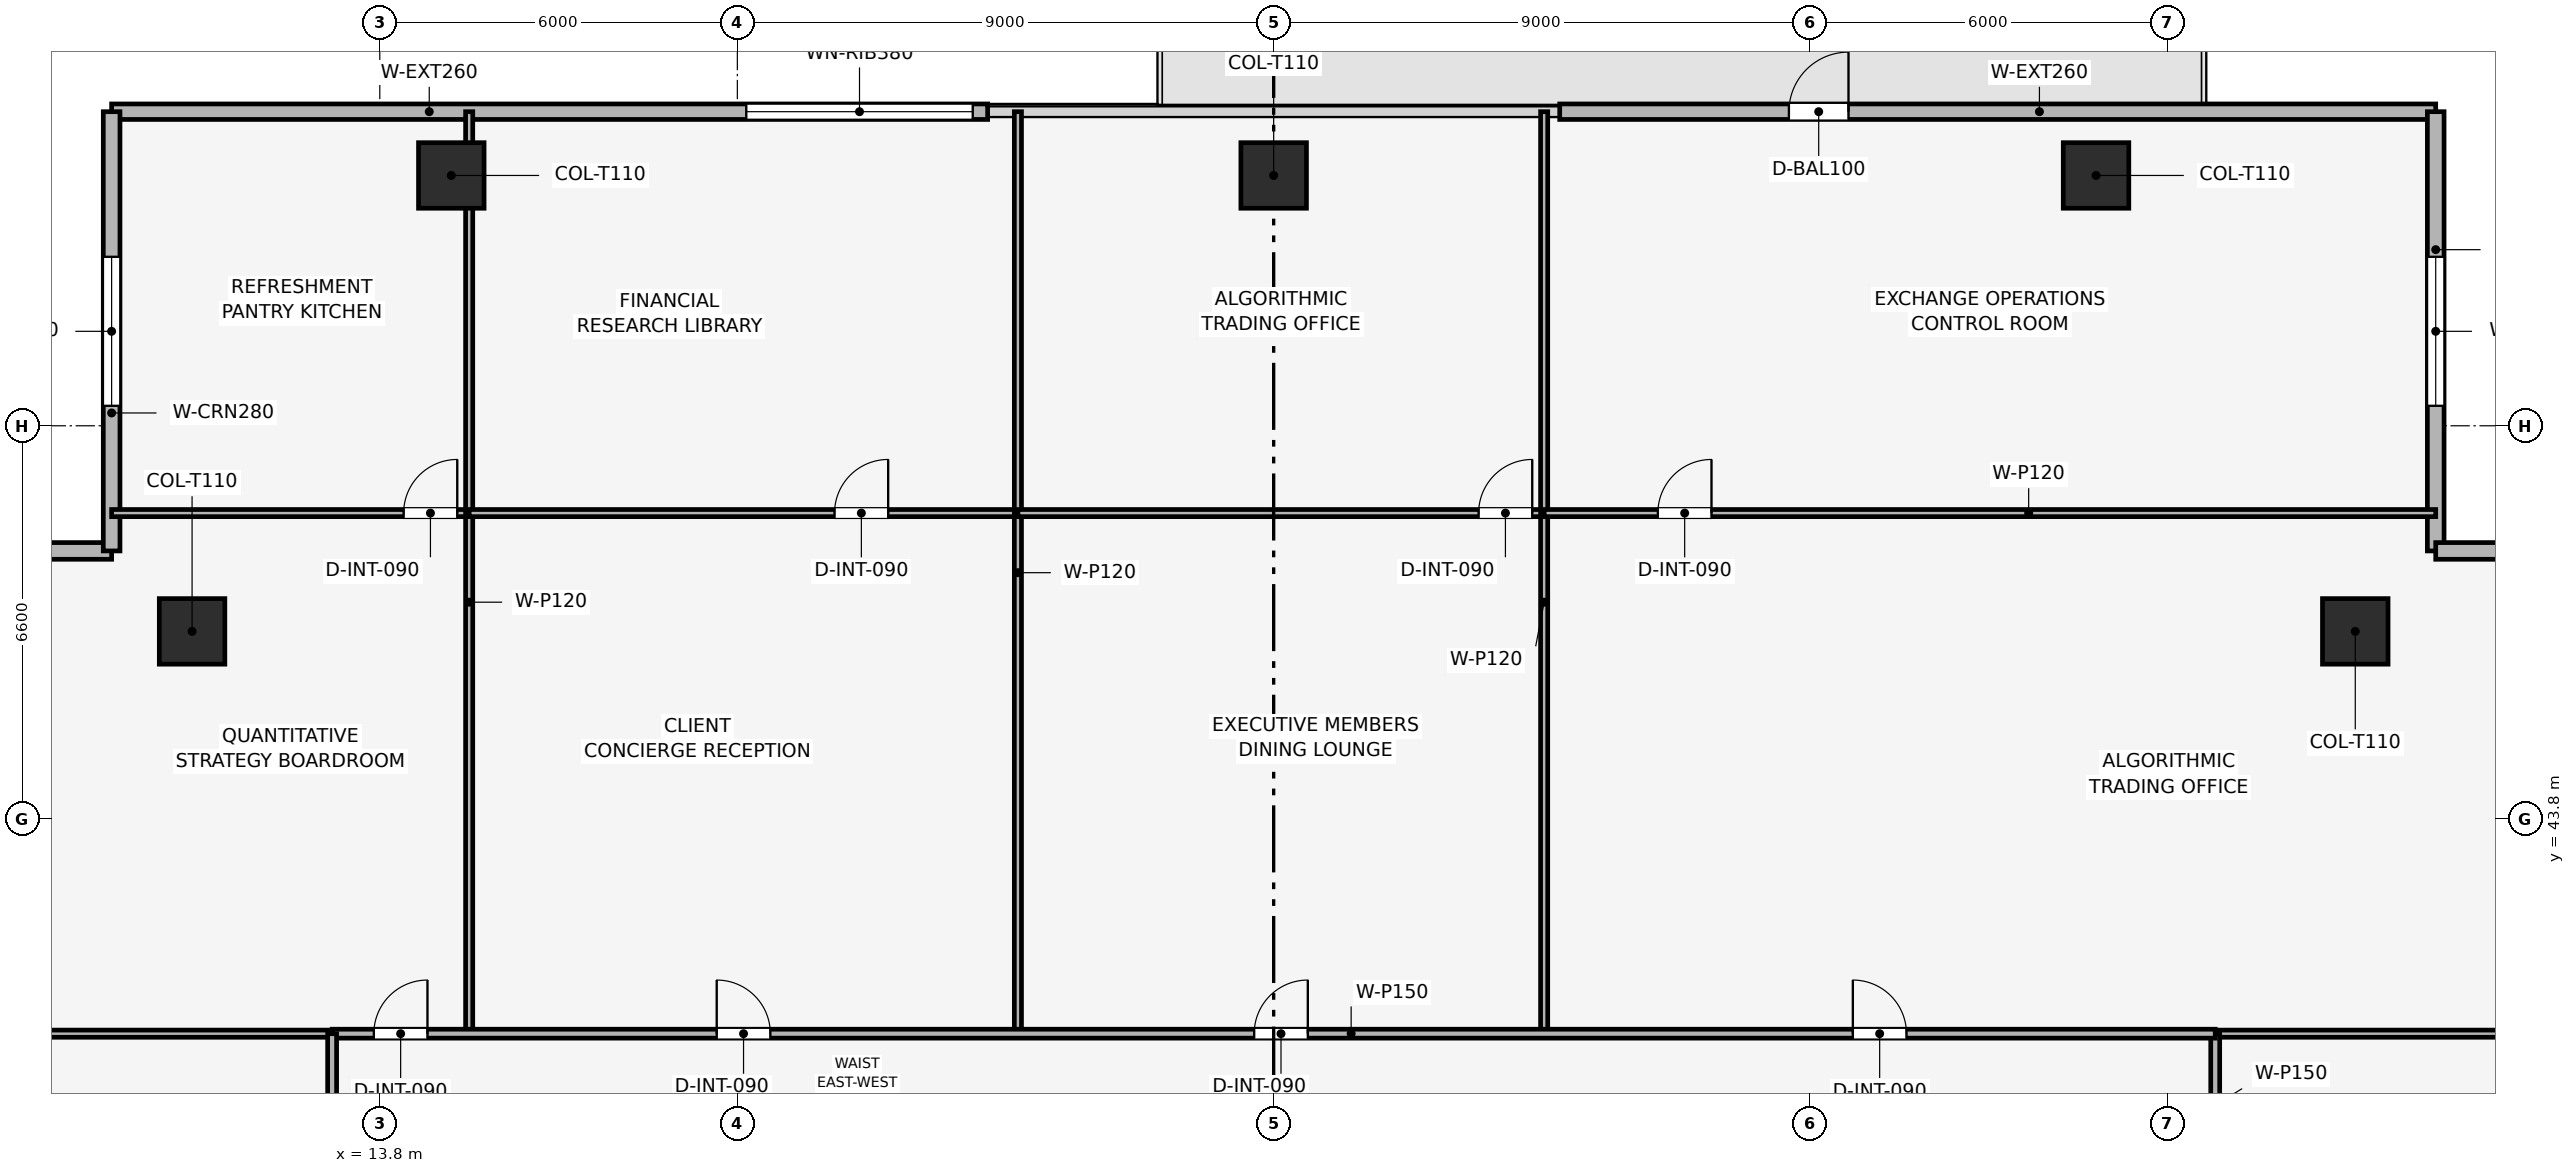
"""IFC4 building model, lengths in metres.
Left out: names, types, materials, properties, quantities, classifications, styles, units other than length and angle.
Written with IfcOpenShell. Run it as: python <this file> out.ifc"""

import sys

from ifc_helpers import new_model, si_unit, direction, frame, frame_2d, origin, origin_2d, place, context, subcontext, project, spatial, rectangle, extrude, element, fill, save


model = new_model("IFC4")
c1 = context("Model", 3, precision=1e-05, world=origin(), true_north=direction((0.0, 1.0)))
c2 = subcontext(c1, "Body", "Model", "MODEL_VIEW")
j1 = project(units=[si_unit("LENGTHUNIT", "METRE"), si_unit("PLANEANGLEUNIT", "RADIAN")], contexts=[c1])
p1 = place(None, origin())
s1 = spatial("IfcSite", under=j1, at=p1, CompositionType="ELEMENT")
p2 = place(p1, origin())
s2 = spatial("IfcBuilding", under=s1, at=p2, CompositionType="ELEMENT")
p3 = place(p2, frame((0.0, 0.0, 218.7)))
s3 = spatial("IfcBuildingStorey", under=s2, at=p3, CompositionType="ELEMENT", Elevation=218.7)
for number, where, z_axis, x_axis in (
    (1, (42.6, 54.6, 0.003), (0.0, 0.0, 1.0), (1.0, 0.0, 0.0)),
    (2, (28.8, 54.6, 0.003), (0.0, 0.0, 1.0), (1.0, 0.0, 0.0)),
    (3, (15.0, 54.6, 0.003), (0.0, 0.0, 1.0), (1.0, 0.0, 0.0)),
    (4, (46.95, 46.95, 0.003), (0.0, 0.0, 1.0), (1.0, 0.0, 0.0)),
    (5, (10.65, 46.95, 0.003), (0.0, 0.0, 1.0), (1.0, 0.0, 0.0)),
):
    element("IfcColumn", number, at=place(p3, frame(where, z_axis=z_axis, x_axis=x_axis)), inside=s3, PredefinedType="COLUMN", context=c2, shape_type="SweptSolid", body=[
        extrude(rectangle(XDim=1.1, YDim=1.1, at=origin_2d()), origin(), (0.0, 0.0, 1.0), 3.494),
    ])
p4 = place(p3, frame((9.3, 55.67, 0.0), z_axis=(0.0, 0.0, 1.0), x_axis=(1.0, 0.0, 0.0)))
e6 = element("IfcWall", 6, at=p4, inside=s3, PredefinedType="SOLIDWALL", context=c2, shape_type="SweptSolid", body=[
    extrude(rectangle(XDim=14.7, YDim=0.26, at=frame_2d((7.35, 0.0))), origin(), (0.0, 0.0, 1.0), 3.5),
])
p5 = place(p4, frame((10.65, 0.0, 0.9)))
e7 = element("IfcOpeningElement", 7, at=p5, cuts=e6, PredefinedType="OPENING", context=c2, shape_type="SweptSolid", body=[
    extrude(rectangle(XDim=3.8, YDim=1.9, at=frame_2d((1.9, 0.95))), frame((0.0, 0.14, 0.0), z_axis=(0.0, -1.0, 0.0), x_axis=(1.0, 0.0, 0.0)), (0.0, 0.0, 1.0), 0.28),
])
p6 = place(p3, frame((33.6, 55.67, 0.0), z_axis=(0.0, 0.0, 1.0), x_axis=(1.0, 0.0, 0.0)))
e8 = element("IfcWall", 8, at=p6, inside=s3, PredefinedType="SOLIDWALL", context=c2, shape_type="SweptSolid", body=[
    extrude(rectangle(XDim=14.7, YDim=0.26, at=frame_2d((7.35, 0.0))), origin(), (0.0, 0.0, 1.0), 3.5),
])
p7 = place(p6, frame((3.846, 0.0, 0.0)))
e9 = element("IfcOpeningElement", 9, at=p7, cuts=e8, PredefinedType="OPENING", context=c2, shape_type="SweptSolid", body=[
    extrude(rectangle(XDim=1.0, YDim=2.2, at=frame_2d((0.5, 1.1))), frame((0.0, 0.14, 0.0), z_axis=(0.0, -1.0, 0.0), x_axis=(1.0, 0.0, 0.0)), (0.0, 0.0, 1.0), 0.28),
])
p8 = place(p3, frame((1.93, 48.3, 0.0), z_axis=(0.0, 0.0, 1.0), x_axis=(1.0, 0.0, 0.0)))
e10 = element("IfcWall", 10, at=p8, inside=s3, PredefinedType="SOLIDWALL", context=c2, shape_type="SweptSolid", body=[
    extrude(rectangle(XDim=7.37, YDim=0.28, at=frame_2d((3.685, 0.0))), origin(), (0.0, 0.0, 1.0), 3.5),
])
p9 = place(p8, frame((2.435, 0.0, 0.9)))
e11 = element("IfcOpeningElement", 11, at=p9, cuts=e10, PredefinedType="OPENING", context=c2, shape_type="SweptSolid", body=[
    extrude(rectangle(XDim=2.5, YDim=1.9, at=frame_2d((1.25, 0.95))), frame((0.0, 0.15, 0.0), z_axis=(0.0, -1.0, 0.0), x_axis=(1.0, 0.0, 0.0)), (0.0, 0.0, 1.0), 0.3),
])
p10 = place(p3, frame((9.3, 48.3, 0.0), z_axis=(0.0, 0.0, 1.0), x_axis=(0.0, 1.0, 0.0)))
e12 = element("IfcWall", 12, at=p10, inside=s3, PredefinedType="SOLIDWALL", context=c2, shape_type="SweptSolid", body=[
    extrude(rectangle(XDim=7.37, YDim=0.28, at=frame_2d((3.685, 0.0))), origin(), (0.0, 0.0, 1.0), 3.5),
])
p11 = place(p10, frame((2.435, 0.0, 0.9)))
e13 = element("IfcOpeningElement", 13, at=p11, cuts=e12, PredefinedType="OPENING", context=c2, shape_type="SweptSolid", body=[
    extrude(rectangle(XDim=2.5, YDim=1.9, at=frame_2d((1.25, 0.95))), frame((0.0, 0.15, 0.0), z_axis=(0.0, -1.0, 0.0), x_axis=(1.0, 0.0, 0.0)), (0.0, 0.0, 1.0), 0.3),
])
p12 = place(p3, frame((48.3, 55.67, 0.0), z_axis=(0.0, 0.0, 1.0), x_axis=(0.0, -1.0, 0.0)))
e14 = element("IfcWall", 14, at=p12, inside=s3, PredefinedType="SOLIDWALL", context=c2, shape_type="SweptSolid", body=[
    extrude(rectangle(XDim=7.37, YDim=0.28, at=frame_2d((3.685, 0.0))), origin(), (0.0, 0.0, 1.0), 3.5),
])
p13 = place(p12, frame((2.435, 0.0, 0.9)))
e15 = element("IfcOpeningElement", 15, at=p13, cuts=e14, PredefinedType="OPENING", context=c2, shape_type="SweptSolid", body=[
    extrude(rectangle(XDim=2.5, YDim=1.9, at=frame_2d((1.25, 0.95))), frame((0.0, 0.15, 0.0), z_axis=(0.0, -1.0, 0.0), x_axis=(1.0, 0.0, 0.0)), (0.0, 0.0, 1.0), 0.3),
])
p14 = place(p3, frame((48.3, 48.3, 0.0), z_axis=(0.0, 0.0, 1.0), x_axis=(1.0, 0.0, 0.0)))
e16 = element("IfcWall", 16, at=p14, inside=s3, PredefinedType="SOLIDWALL", context=c2, shape_type="SweptSolid", body=[
    extrude(rectangle(XDim=7.37, YDim=0.28, at=frame_2d((3.685, 0.0))), origin(), (0.0, 0.0, 1.0), 3.5),
])
p15 = place(p14, frame((2.435, 0.0, 0.9)))
e17 = element("IfcOpeningElement", 17, at=p15, cuts=e16, PredefinedType="OPENING", context=c2, shape_type="SweptSolid", body=[
    extrude(rectangle(XDim=2.5, YDim=1.9, at=frame_2d((1.25, 0.95))), frame((0.0, 0.15, 0.0), z_axis=(0.0, -1.0, 0.0), x_axis=(1.0, 0.0, 0.0)), (0.0, 0.0, 1.0), 0.3),
])
p16 = place(p3, frame((9.3, 48.935, 0.0), z_axis=(0.0, 0.0, 1.0), x_axis=(1.0, 0.0, 0.0)))
e18 = element("IfcWall", 18, at=p16, inside=s3, PredefinedType="PARTITIONING", context=c2, shape_type="SweptSolid", body=[
    extrude(rectangle(XDim=6.0, YDim=0.12, at=frame_2d((3.0, 0.0))), origin(), (0.0, 0.0, 1.0), 2.885),
])
p17 = place(p16, frame((4.9, 0.0, 0.0)))
e19 = element("IfcOpeningElement", 19, at=p17, cuts=e18, PredefinedType="OPENING", context=c2, shape_type="SweptSolid", body=[
    extrude(rectangle(XDim=0.9, YDim=2.1, at=frame_2d((0.45, 1.05))), frame((0.0, 0.07, 0.0), z_axis=(0.0, -1.0, 0.0), x_axis=(1.0, 0.0, 0.0)), (0.0, 0.0, 1.0), 0.14),
])
p18 = place(p3, frame((15.3, 40.2, 0.0), z_axis=(0.0, 0.0, 1.0), x_axis=(0.0, 1.0, 0.0)))
e20 = element("IfcWall", 20, at=p18, inside=s3, PredefinedType="PARTITIONING", context=c2, shape_type="SweptSolid", body=[
    extrude(rectangle(XDim=15.47, YDim=0.12, at=frame_2d((7.735, 0.0))), origin(), (0.0, 0.0, 1.0), 2.885),
])
p19 = place(p3, frame((15.3, 48.935, 0.0), z_axis=(0.0, 0.0, 1.0), x_axis=(1.0, 0.0, 0.0)))
e21 = element("IfcWall", 21, at=p19, inside=s3, PredefinedType="PARTITIONING", context=c2, shape_type="SweptSolid", body=[
    extrude(rectangle(XDim=9.208, YDim=0.12, at=frame_2d((4.604, 0.0))), origin(), (0.0, 0.0, 1.0), 3.035),
])
p20 = place(p19, frame((6.131, 0.0, 0.0)))
e22 = element("IfcOpeningElement", 22, at=p20, cuts=e21, PredefinedType="OPENING", context=c2, shape_type="SweptSolid", body=[
    extrude(rectangle(XDim=0.9, YDim=2.1, at=frame_2d((0.45, 1.05))), frame((0.0, 0.07, 0.0), z_axis=(0.0, -1.0, 0.0), x_axis=(1.0, 0.0, 0.0)), (0.0, 0.0, 1.0), 0.14),
])
p21 = place(p3, frame((24.508, 40.2, 0.0), z_axis=(0.0, 0.0, 1.0), x_axis=(0.0, 1.0, 0.0)))
e23 = element("IfcWall", 23, at=p21, inside=s3, PredefinedType="PARTITIONING", context=c2, shape_type="SweptSolid", body=[
    extrude(rectangle(XDim=15.47, YDim=0.12, at=frame_2d((7.735, 0.0))), origin(), (0.0, 0.0, 1.0), 2.885),
])
p22 = place(p3, frame((24.508, 48.935, 0.0), z_axis=(0.0, 0.0, 1.0), x_axis=(1.0, 0.0, 0.0)))
e24 = element("IfcWall", 24, at=p22, inside=s3, PredefinedType="PARTITIONING", context=c2, shape_type="SweptSolid", body=[
    extrude(rectangle(XDim=8.831, YDim=0.12, at=frame_2d((4.416, 0.0))), origin(), (0.0, 0.0, 1.0), 3.035),
])
p23 = place(p22, frame((7.731, 0.0, 0.0)))
e25 = element("IfcOpeningElement", 25, at=p23, cuts=e24, PredefinedType="OPENING", context=c2, shape_type="SweptSolid", body=[
    extrude(rectangle(XDim=0.9, YDim=2.1, at=frame_2d((0.45, 1.05))), frame((0.0, 0.07, 0.0), z_axis=(0.0, -1.0, 0.0), x_axis=(1.0, 0.0, 0.0)), (0.0, 0.0, 1.0), 0.14),
])
p24 = place(p3, frame((33.339, 40.2, 0.0), z_axis=(0.0, 0.0, 1.0), x_axis=(0.0, 1.0, 0.0)))
e26 = element("IfcWall", 26, at=p24, inside=s3, PredefinedType="PARTITIONING", context=c2, shape_type="SweptSolid", body=[
    extrude(rectangle(XDim=15.47, YDim=0.12, at=frame_2d((7.735, 0.0))), origin(), (0.0, 0.0, 1.0), 2.885),
])
p25 = place(p3, frame((33.339, 48.935, 0.0), z_axis=(0.0, 0.0, 1.0), x_axis=(1.0, 0.0, 0.0)))
e27 = element("IfcWall", 27, at=p25, inside=s3, PredefinedType="PARTITIONING", context=c2, shape_type="SweptSolid", body=[
    extrude(rectangle(XDim=14.961, YDim=0.12, at=frame_2d((7.48, 0.0))), origin(), (0.0, 0.0, 1.0), 2.885),
])
p26 = place(p25, frame((1.908, 0.0, 0.0)))
e28 = element("IfcOpeningElement", 28, at=p26, cuts=e27, PredefinedType="OPENING", context=c2, shape_type="SweptSolid", body=[
    extrude(rectangle(XDim=0.9, YDim=2.1, at=frame_2d((0.45, 1.05))), frame((0.0, 0.07, 0.0), z_axis=(0.0, -1.0, 0.0), x_axis=(1.0, 0.0, 0.0)), (0.0, 0.0, 1.0), 0.14),
])
p27 = place(p3, frame((1.93, 40.2, 0.0), z_axis=(0.0, 0.0, 1.0), x_axis=(1.0, 0.0, 0.0)))
e29 = element("IfcWall", 29, at=p27, inside=s3, PredefinedType="PARTITIONING", context=c2, shape_type="SweptSolid", body=[
    extrude(rectangle(XDim=11.07, YDim=0.12, at=frame_2d((5.535, 0.0))), origin(), (0.0, 0.0, 1.0), 2.885),
])
p28 = place(p3, frame((44.6, 40.2, 0.0), z_axis=(0.0, 0.0, 1.0), x_axis=(1.0, 0.0, 0.0)))
e30 = element("IfcWall", 30, at=p28, inside=s3, PredefinedType="PARTITIONING", context=c2, shape_type="SweptSolid", body=[
    extrude(rectangle(XDim=11.07, YDim=0.12, at=frame_2d((5.535, 0.0))), origin(), (0.0, 0.0, 1.0), 2.885),
])
p29 = place(p3, frame((44.6, 37.8, 0.0), z_axis=(0.0, 0.0, 1.0), x_axis=(0.0, 1.0, 0.0)))
e31 = element("IfcWall", 31, at=p29, inside=s3, PredefinedType="PARTITIONING", context=c2, shape_type="SweptSolid", body=[
    extrude(rectangle(XDim=2.4, YDim=0.15, at=frame_2d((1.2, 0.0))), origin(), (0.0, 0.0, 1.0), 3.5),
])
p30 = place(p3, frame((13.0, 40.2, 0.0), z_axis=(0.0, 0.0, 1.0), x_axis=(1.0, 0.0, 0.0)))
e32 = element("IfcWall", 32, at=p30, inside=s3, PredefinedType="PARTITIONING", context=c2, shape_type="SweptSolid", body=[
    extrude(rectangle(XDim=31.6, YDim=0.15, at=frame_2d((15.8, 0.0))), origin(), (0.0, 0.0, 1.0), 3.035),
])
p31 = place(p30, frame((0.7, 0.0, 0.0)))
e33 = element("IfcOpeningElement", 33, at=p31, cuts=e32, PredefinedType="OPENING", context=c2, shape_type="SweptSolid", body=[
    extrude(rectangle(XDim=0.9, YDim=2.1, at=frame_2d((0.45, 1.05))), frame((0.0, 0.085, 0.0), z_axis=(0.0, -1.0, 0.0), x_axis=(1.0, 0.0, 0.0)), (0.0, 0.0, 1.0), 0.17),
])
p32 = place(p30, frame((6.454, 0.0, 0.0)))
e34 = element("IfcOpeningElement", 34, at=p32, cuts=e32, PredefinedType="OPENING", context=c2, shape_type="SweptSolid", body=[
    extrude(rectangle(XDim=0.9, YDim=2.1, at=frame_2d((0.45, 1.05))), frame((0.0, 0.085, 0.0), z_axis=(0.0, -1.0, 0.0), x_axis=(1.0, 0.0, 0.0)), (0.0, 0.0, 1.0), 0.17),
])
p33 = place(p30, frame((15.473, 0.0, 0.0)))
e35 = element("IfcOpeningElement", 35, at=p33, cuts=e32, PredefinedType="OPENING", context=c2, shape_type="SweptSolid", body=[
    extrude(rectangle(XDim=0.9, YDim=2.1, at=frame_2d((0.45, 1.05))), frame((0.0, 0.085, 0.0), z_axis=(0.0, -1.0, 0.0), x_axis=(1.0, 0.0, 0.0)), (0.0, 0.0, 1.0), 0.17),
])
p34 = place(p30, frame((25.519, 0.0, 0.0)))
e36 = element("IfcOpeningElement", 36, at=p34, cuts=e32, PredefinedType="OPENING", context=c2, shape_type="SweptSolid", body=[
    extrude(rectangle(XDim=0.9, YDim=2.1, at=frame_2d((0.45, 1.05))), frame((0.0, 0.085, 0.0), z_axis=(0.0, -1.0, 0.0), x_axis=(1.0, 0.0, 0.0)), (0.0, 0.0, 1.0), 0.17),
])
p35 = place(p3, frame((13.0, 17.4, 0.0), z_axis=(0.0, 0.0, 1.0), x_axis=(0.0, 1.0, 0.0)))
e37 = element("IfcWall", 37, at=p35, inside=s3, PredefinedType="PARTITIONING", context=c2, shape_type="SweptSolid", body=[
    extrude(rectangle(XDim=22.8, YDim=0.15, at=frame_2d((11.4, 0.0))), origin(), (0.0, 0.0, 1.0), 3.035),
])
p36 = place(p35, frame((4.641, 0.0, 0.0)))
e38 = element("IfcOpeningElement", 38, at=p36, cuts=e37, PredefinedType="OPENING", context=c2, shape_type="SweptSolid", body=[
    extrude(rectangle(XDim=0.9, YDim=2.1, at=frame_2d((0.45, 1.05))), frame((0.0, 0.085, 0.0), z_axis=(0.0, -1.0, 0.0), x_axis=(1.0, 0.0, 0.0)), (0.0, 0.0, 1.0), 0.17),
])
p37 = place(p35, frame((13.641, 0.0, 0.0)))
e39 = element("IfcOpeningElement", 39, at=p37, cuts=e37, PredefinedType="OPENING", context=c2, shape_type="SweptSolid", body=[
    extrude(rectangle(XDim=0.9, YDim=2.1, at=frame_2d((0.45, 1.05))), frame((0.0, 0.085, 0.0), z_axis=(0.0, -1.0, 0.0), x_axis=(1.0, 0.0, 0.0)), (0.0, 0.0, 1.0), 0.17),
])
p38 = place(p7, origin())
e40 = element("IfcDoor", 40, at=p38, inside=s3, OperationType="SINGLE_SWING_RIGHT", PredefinedType="DOOR", context=c2, shape_type="SweptSolid", body=[
    extrude(rectangle(XDim=1.0, YDim=2.2, at=frame_2d((0.5, 1.1))), frame((0.0, 0.025, 0.0), z_axis=(0.0, -1.0, 0.0), x_axis=(1.0, 0.0, 0.0)), (0.0, 0.0, 1.0), 0.05),
])
fill(e9, e40)
p39 = place(p5, origin())
e41 = element("IfcWindow", 41, at=p39, inside=s3, PartitioningType="SINGLE_PANEL", PredefinedType="WINDOW", context=c2, shape_type="SweptSolid", body=[
    extrude(rectangle(XDim=3.8, YDim=1.9, at=frame_2d((1.9, 0.95))), frame((0.0, 0.03, 0.0), z_axis=(0.0, -1.0, 0.0), x_axis=(1.0, 0.0, 0.0)), (0.0, 0.0, 1.0), 0.06),
])
fill(e7, e41)
p40 = place(p11, origin())
e42 = element("IfcWindow", 42, at=p40, inside=s3, PartitioningType="SINGLE_PANEL", PredefinedType="WINDOW", context=c2, shape_type="SweptSolid", body=[
    extrude(rectangle(XDim=2.5, YDim=1.9, at=frame_2d((1.25, 0.95))), frame((0.0, 0.03, 0.0), z_axis=(0.0, -1.0, 0.0), x_axis=(1.0, 0.0, 0.0)), (0.0, 0.0, 1.0), 0.06),
])
fill(e13, e42)
p41 = place(p13, origin())
e43 = element("IfcWindow", 43, at=p41, inside=s3, PartitioningType="SINGLE_PANEL", PredefinedType="WINDOW", context=c2, shape_type="SweptSolid", body=[
    extrude(rectangle(XDim=2.5, YDim=1.9, at=frame_2d((1.25, 0.95))), frame((0.0, 0.03, 0.0), z_axis=(0.0, -1.0, 0.0), x_axis=(1.0, 0.0, 0.0)), (0.0, 0.0, 1.0), 0.06),
])
fill(e15, e43)
p42 = place(p17, origin())
e44 = element("IfcDoor", 44, at=p42, inside=s3, OperationType="SINGLE_SWING_RIGHT", PredefinedType="DOOR", context=c2, shape_type="SweptSolid", body=[
    extrude(rectangle(XDim=0.9, YDim=2.1, at=frame_2d((0.45, 1.05))), frame((0.0, 0.025, 0.0), z_axis=(0.0, -1.0, 0.0), x_axis=(1.0, 0.0, 0.0)), (0.0, 0.0, 1.0), 0.05),
])
fill(e19, e44)
p43 = place(p20, origin())
e45 = element("IfcDoor", 45, at=p43, inside=s3, OperationType="SINGLE_SWING_RIGHT", PredefinedType="DOOR", context=c2, shape_type="SweptSolid", body=[
    extrude(rectangle(XDim=0.9, YDim=2.1, at=frame_2d((0.45, 1.05))), frame((0.0, 0.025, 0.0), z_axis=(0.0, -1.0, 0.0), x_axis=(1.0, 0.0, 0.0)), (0.0, 0.0, 1.0), 0.05),
])
fill(e22, e45)
p44 = place(p23, origin())
e46 = element("IfcDoor", 46, at=p44, inside=s3, OperationType="SINGLE_SWING_RIGHT", PredefinedType="DOOR", context=c2, shape_type="SweptSolid", body=[
    extrude(rectangle(XDim=0.9, YDim=2.1, at=frame_2d((0.45, 1.05))), frame((0.0, 0.025, 0.0), z_axis=(0.0, -1.0, 0.0), x_axis=(1.0, 0.0, 0.0)), (0.0, 0.0, 1.0), 0.05),
])
fill(e25, e46)
p45 = place(p26, origin())
e47 = element("IfcDoor", 47, at=p45, inside=s3, OperationType="SINGLE_SWING_RIGHT", PredefinedType="DOOR", context=c2, shape_type="SweptSolid", body=[
    extrude(rectangle(XDim=0.9, YDim=2.1, at=frame_2d((0.45, 1.05))), frame((0.0, 0.025, 0.0), z_axis=(0.0, -1.0, 0.0), x_axis=(1.0, 0.0, 0.0)), (0.0, 0.0, 1.0), 0.05),
])
fill(e28, e47)
p46 = place(p31, origin())
e48 = element("IfcDoor", 48, at=p46, inside=s3, OperationType="SINGLE_SWING_RIGHT", PredefinedType="DOOR", context=c2, shape_type="SweptSolid", body=[
    extrude(rectangle(XDim=0.9, YDim=2.1, at=frame_2d((0.45, 1.05))), frame((0.0, 0.025, 0.0), z_axis=(0.0, -1.0, 0.0), x_axis=(1.0, 0.0, 0.0)), (0.0, 0.0, 1.0), 0.05),
])
fill(e33, e48)
p47 = place(p32, origin())
e49 = element("IfcDoor", 49, at=p47, inside=s3, OperationType="SINGLE_SWING_LEFT", PredefinedType="DOOR", context=c2, shape_type="SweptSolid", body=[
    extrude(rectangle(XDim=0.9, YDim=2.1, at=frame_2d((0.45, 1.05))), frame((0.0, 0.025, 0.0), z_axis=(0.0, -1.0, 0.0), x_axis=(1.0, 0.0, 0.0)), (0.0, 0.0, 1.0), 0.05),
])
fill(e34, e49)
p48 = place(p33, origin())
e50 = element("IfcDoor", 50, at=p48, inside=s3, OperationType="SINGLE_SWING_RIGHT", PredefinedType="DOOR", context=c2, shape_type="SweptSolid", body=[
    extrude(rectangle(XDim=0.9, YDim=2.1, at=frame_2d((0.45, 1.05))), frame((0.0, 0.025, 0.0), z_axis=(0.0, -1.0, 0.0), x_axis=(1.0, 0.0, 0.0)), (0.0, 0.0, 1.0), 0.05),
])
fill(e35, e50)
p49 = place(p34, origin())
e51 = element("IfcDoor", 51, at=p49, inside=s3, OperationType="SINGLE_SWING_LEFT", PredefinedType="DOOR", context=c2, shape_type="SweptSolid", body=[
    extrude(rectangle(XDim=0.9, YDim=2.1, at=frame_2d((0.45, 1.05))), frame((0.0, 0.025, 0.0), z_axis=(0.0, -1.0, 0.0), x_axis=(1.0, 0.0, 0.0)), (0.0, 0.0, 1.0), 0.05),
])
fill(e36, e51)
save(model, sys.argv[1])
